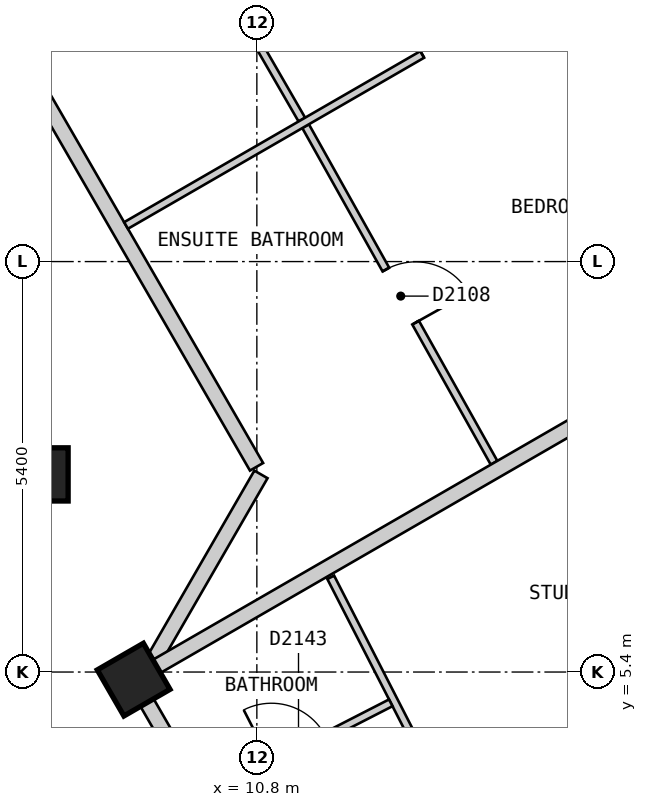
"""IFC4 building model, lengths in metres.
Left out: names, types, materials, properties, quantities, classifications, styles, units other than length and angle.
Written with IfcOpenShell. Run it as: python <this file> out.ifc"""

import sys

from ifc_helpers import new_model, si_unit, direction, frame, frame_2d, origin, origin_2d, place, context, subcontext, project, spatial, polyline, rectangle, outline, extrude, element, fill, save


model = new_model("IFC4")
c1 = context("Model", 3, precision=1e-05, world=origin(), true_north=direction((0.0, 1.0)))
c2 = subcontext(c1, "Body", "Model", "MODEL_VIEW")
j1 = project(units=[si_unit("LENGTHUNIT", "METRE"), si_unit("PLANEANGLEUNIT", "RADIAN")], contexts=[c1])
p1 = place(None, origin())
s1 = spatial("IfcSite", under=j1, at=p1, CompositionType="ELEMENT")
p2 = place(p1, origin())
s2 = spatial("IfcBuilding", under=s1, at=p2, CompositionType="ELEMENT")
p3 = place(p2, frame((0.0, 0.0, 211.8)))
s3 = spatial("IfcBuildingStorey", under=s2, at=p3, CompositionType="ELEMENT", Elevation=211.8)
for number, where, z_axis, x_axis in (
    (1, (9.179, 5.3, 0.0), (0.0, 0.0, 1.0), (-0.5, 0.866, 0.0)),
    (2, (7.967, 8.0, 0.0), (0.0, 0.0, 1.0), (1.0, 0.0, 0.0)),
):
    element("IfcColumn", number, at=place(p3, frame(where, z_axis=z_axis, x_axis=x_axis)), inside=s3, PredefinedType="COLUMN", context=c2, shape_type="SweptSolid", body=[
        extrude(rectangle(XDim=0.7, YDim=0.7, at=origin_2d()), origin(), (0.0, 0.0, 1.0), 3.0),
    ])
p4 = place(p3, frame((23.599, 0.825, 0.0), z_axis=(0.0, 0.0, 1.0), x_axis=(-0.500003656944, 0.866023292436, 0.0)))
e3 = element("IfcWall", 3, at=p4, inside=s3, PredefinedType="SOLIDWALL", context=c2, shape_type="SweptSolid", body=[
    extrude(outline(polyline([(0.0, -0.15), (22.17, -0.15), (22.09, 0.15), (0.08, 0.15), (0.0, -0.15)])), origin(), (0.0, 0.0, 1.0), 2.7),
])
p5 = place(p4, frame((2.497, 0.0, 0.15)))
e4 = element("IfcOpeningElement", 4, at=p5, cuts=e3, PredefinedType="OPENING", context=c2, shape_type="SweptSolid", body=[
    extrude(rectangle(XDim=1.5, YDim=2.1, at=frame_2d((0.75, 1.05))), frame((0.0, 0.16, 0.0), z_axis=(0.0, -1.0, 0.0), x_axis=(1.0, 0.0, 0.0)), (0.0, 0.0, 1.0), 0.32),
])
p6 = place(p4, frame((7.723, 0.0, 0.15)))
e5 = element("IfcOpeningElement", 5, at=p6, cuts=e3, PredefinedType="OPENING", context=c2, shape_type="SweptSolid", body=[
    extrude(rectangle(XDim=1.5, YDim=2.1, at=frame_2d((0.75, 1.05))), frame((0.0, 0.16, 0.0), z_axis=(0.0, -1.0, 0.0), x_axis=(1.0, 0.0, 0.0)), (0.0, 0.0, 1.0), 0.32),
])
p7 = place(p4, frame((12.948, 0.0, 0.15)))
e6 = element("IfcOpeningElement", 6, at=p7, cuts=e3, PredefinedType="OPENING", context=c2, shape_type="SweptSolid", body=[
    extrude(rectangle(XDim=1.5, YDim=2.1, at=frame_2d((0.75, 1.05))), frame((0.0, 0.16, 0.0), z_axis=(0.0, -1.0, 0.0), x_axis=(1.0, 0.0, 0.0)), (0.0, 0.0, 1.0), 0.32),
])
p8 = place(p4, frame((18.173, 0.0, 0.15)))
e7 = element("IfcOpeningElement", 7, at=p8, cuts=e3, PredefinedType="OPENING", context=c2, shape_type="SweptSolid", body=[
    extrude(rectangle(XDim=1.5, YDim=2.1, at=frame_2d((0.75, 1.05))), frame((0.0, 0.16, 0.0), z_axis=(0.0, -1.0, 0.0), x_axis=(1.0, 0.0, 0.0)), (0.0, 0.0, 1.0), 0.32),
])
p9 = place(p3, frame((9.238, 5.2, 0.0), z_axis=(0.0, 0.0, 1.0), x_axis=(0.500025705601, -0.86601056214, 0.0)))
e8 = element("IfcWall", 8, at=p9, inside=s3, PredefinedType="PARTITIONING", context=c2, shape_type="SweptSolid", body=[
    extrude(rectangle(XDim=7.735, YDim=0.2, at=frame_2d((3.868, 0.0))), origin(), (0.0, 0.0, 1.0), 2.7),
])
p10 = place(p9, frame((6.705, 0.0, 0.0)))
e9 = element("IfcOpeningElement", 9, at=p10, cuts=e8, PredefinedType="OPENING", context=c2, shape_type="SweptSolid", body=[
    extrude(rectangle(XDim=1.0, YDim=2.1, at=frame_2d((0.5, 1.05))), frame((0.0, 0.11, 0.0), z_axis=(0.0, -1.0, 0.0), x_axis=(1.0, 0.0, 0.0)), (0.0, 0.0, 1.0), 0.22),
])
p11 = place(p9, frame((1.988, 0.0, 0.0)))
e10 = element("IfcOpeningElement", 10, at=p11, cuts=e8, PredefinedType="OPENING", context=c2, shape_type="SweptSolid", body=[
    extrude(rectangle(XDim=1.0, YDim=2.1, at=frame_2d((0.5, 1.05))), frame((0.0, 0.11, 0.0), z_axis=(0.0, -1.0, 0.0), x_axis=(1.0, 0.0, 0.0)), (0.0, 0.0, 1.0), 0.22),
])
p12 = place(p3, frame((5.485, 17.3, 0.0), z_axis=(0.0, 0.0, 1.0), x_axis=(0.499943285704, -0.866058145322, 0.0)))
e11 = element("IfcWall", 11, at=p12, inside=s3, PredefinedType="PARTITIONING", context=c2, shape_type="SweptSolid", body=[
    extrude(rectangle(XDim=10.623, YDim=0.2, at=frame_2d((5.312, 0.0))), origin(), (0.0, 0.0, 1.0), 2.7),
])
p13 = place(p3, frame((9.454, 5.574, 0.0), z_axis=(0.0, 0.0, 1.0), x_axis=(0.499795394297, 0.86614350072, 0.0)))
e12 = element("IfcWall", 12, at=p13, inside=s3, PredefinedType="PARTITIONING", context=c2, shape_type="SweptSolid", body=[
    extrude(rectangle(XDim=2.801, YDim=0.2, at=frame_2d((1.4, 0.0))), origin(), (0.0, 0.0, 1.0), 2.7),
])
p14 = place(p3, frame((8.829, 17.107, 0.0), z_axis=(0.0, 0.0, 1.0), x_axis=(0.500022055211, -0.866012669828, 0.0)))
e13 = element("IfcWall", 13, at=p14, inside=s3, PredefinedType="PARTITIONING", context=c2, shape_type="SweptSolid", body=[
    extrude(rectangle(XDim=5.126, YDim=0.1, at=frame_2d((2.563, 0.0))), origin(), (0.0, 0.0, 1.0), 2.7),
])
p15 = place(p14, frame((2.163, 0.0, 0.0)))
e14 = element("IfcOpeningElement", 14, at=p15, cuts=e13, PredefinedType="OPENING", context=c2, shape_type="SweptSolid", body=[
    extrude(rectangle(XDim=0.8, YDim=2.1, at=frame_2d((0.4, 1.05))), frame((0.0, 0.06, 0.0), z_axis=(0.0, -1.0, 0.0), x_axis=(1.0, 0.0, 0.0)), (0.0, 0.0, 1.0), 0.12),
])
p16 = place(p3, frame((11.441, 12.582, 0.0), z_axis=(0.0, 0.0, 1.0), x_axis=(0.488568218554, -0.872525699231, 0.0)))
e15 = element("IfcWall", 15, at=p16, inside=s3, PredefinedType="PARTITIONING", context=c2, shape_type="SweptSolid", body=[
    extrude(rectangle(XDim=5.076, YDim=0.1, at=frame_2d((2.538, 0.0))), origin(), (0.0, 0.0, 1.0), 2.7),
])
p17 = place(p16, frame((2.163, 0.0, 0.0)))
e16 = element("IfcOpeningElement", 16, at=p17, cuts=e15, PredefinedType="OPENING", context=c2, shape_type="SweptSolid", body=[
    extrude(rectangle(XDim=0.8, YDim=2.1, at=frame_2d((0.4, 1.05))), frame((0.0, 0.06, 0.0), z_axis=(0.0, -1.0, 0.0), x_axis=(1.0, 0.0, 0.0)), (0.0, 0.0, 1.0), 0.12),
])
p18 = place(p3, frame((11.772, 6.646, 0.0), z_axis=(0.0, 0.0, 1.0), x_axis=(0.456175983405, -0.889889584254, 0.0)))
e17 = element("IfcWall", 17, at=p18, inside=s3, PredefinedType="PARTITIONING", context=c2, shape_type="SweptSolid", body=[
    extrude(rectangle(XDim=3.348, YDim=0.1, at=frame_2d((1.674, 0.0))), origin(), (0.0, 0.0, 1.0), 2.7),
])
p19 = place(p3, frame((10.178, 3.772, 0.0), z_axis=(0.0, 0.0, 1.0), x_axis=(0.889732071959, 0.456483121405, 0.0)))
e18 = element("IfcWall", 18, at=p19, inside=s3, PredefinedType="PARTITIONING", context=c2, shape_type="SweptSolid", body=[
    extrude(rectangle(XDim=2.679, YDim=0.1, at=frame_2d((1.34, 0.0))), origin(), (0.0, 0.0, 1.0), 2.7),
])
p20 = place(p19, frame((0.915, 0.0, 0.0)))
e19 = element("IfcOpeningElement", 19, at=p20, cuts=e18, PredefinedType="OPENING", context=c2, shape_type="SweptSolid", body=[
    extrude(rectangle(XDim=0.8, YDim=2.1, at=frame_2d((0.4, 1.05))), frame((0.0, 0.06, 0.0), z_axis=(0.0, -1.0, 0.0), x_axis=(1.0, 0.0, 0.0)), (0.0, 0.0, 1.0), 0.12),
])
p21 = place(p3, frame((9.079, 11.275, 0.0), z_axis=(0.0, 0.0, 1.0), x_axis=(0.866001485781, 0.500041424909, 0.0)))
e20 = element("IfcWall", 20, at=p21, inside=s3, PredefinedType="PARTITIONING", context=c2, shape_type="SweptSolid", body=[
    extrude(rectangle(XDim=7.2, YDim=0.1, at=frame_2d((3.6, 0.0))), origin(), (0.0, 0.0, 1.0), 2.7),
])
p22 = place(p21, frame((4.5, 0.0, 0.0)))
e21 = element("IfcOpeningElement", 21, at=p22, cuts=e20, PredefinedType="OPENING", context=c2, shape_type="SweptSolid", body=[
    extrude(rectangle(XDim=0.9, YDim=2.1, at=frame_2d((0.45, 1.05))), frame((0.0, 0.06, 0.0), z_axis=(0.0, -1.0, 0.0), x_axis=(1.0, 0.0, 0.0)), (0.0, 0.0, 1.0), 0.12),
])
p23 = place(p3, frame((11.879, 0.826, 0.0), z_axis=(0.0, 0.0, 1.0), x_axis=(0.866065245018, 0.499930986609, 0.0)))
e22 = element("IfcWall", 22, at=p23, inside=s3, PredefinedType="PARTITIONING", context=c2, shape_type="SweptSolid", body=[
    extrude(rectangle(XDim=10.0, YDim=0.2, at=frame_2d((5.0, 0.0))), origin(), (0.0, 0.0, 1.0), 2.7),
])
p24 = place(p3, frame((9.354, 5.401, 0.0), z_axis=(0.0, 0.0, 1.0), x_axis=(0.866018411306, 0.500012111133, 0.0)))
e23 = element("IfcWall", 23, at=p24, inside=s3, PredefinedType="PARTITIONING", context=c2, shape_type="SweptSolid", body=[
    extrude(rectangle(XDim=9.898, YDim=0.2, at=frame_2d((4.949, 0.0))), origin(), (0.0, 0.0, 1.0), 2.7),
])
p25 = place(p22, origin())
e24 = element("IfcDoor", 24, at=p25, inside=s3, OperationType="SINGLE_SWING_RIGHT", PredefinedType="DOOR", context=c2, shape_type="SweptSolid", body=[
    extrude(rectangle(XDim=0.9, YDim=2.1, at=frame_2d((0.45, 1.05))), frame((0.0, 0.025, 0.0), z_axis=(0.0, -1.0, 0.0), x_axis=(1.0, 0.0, 0.0)), (0.0, 0.0, 1.0), 0.05),
])
fill(e21, e24)
p26 = place(p17, origin())
e25 = element("IfcDoor", 25, at=p26, inside=s3, OperationType="SINGLE_SWING_RIGHT", PredefinedType="DOOR", context=c2, shape_type="SweptSolid", body=[
    extrude(rectangle(XDim=0.8, YDim=2.1, at=frame_2d((0.4, 1.05))), frame((0.0, 0.025, 0.0), z_axis=(0.0, -1.0, 0.0), x_axis=(1.0, 0.0, 0.0)), (0.0, 0.0, 1.0), 0.05),
])
fill(e16, e25)
save(model, sys.argv[1])
